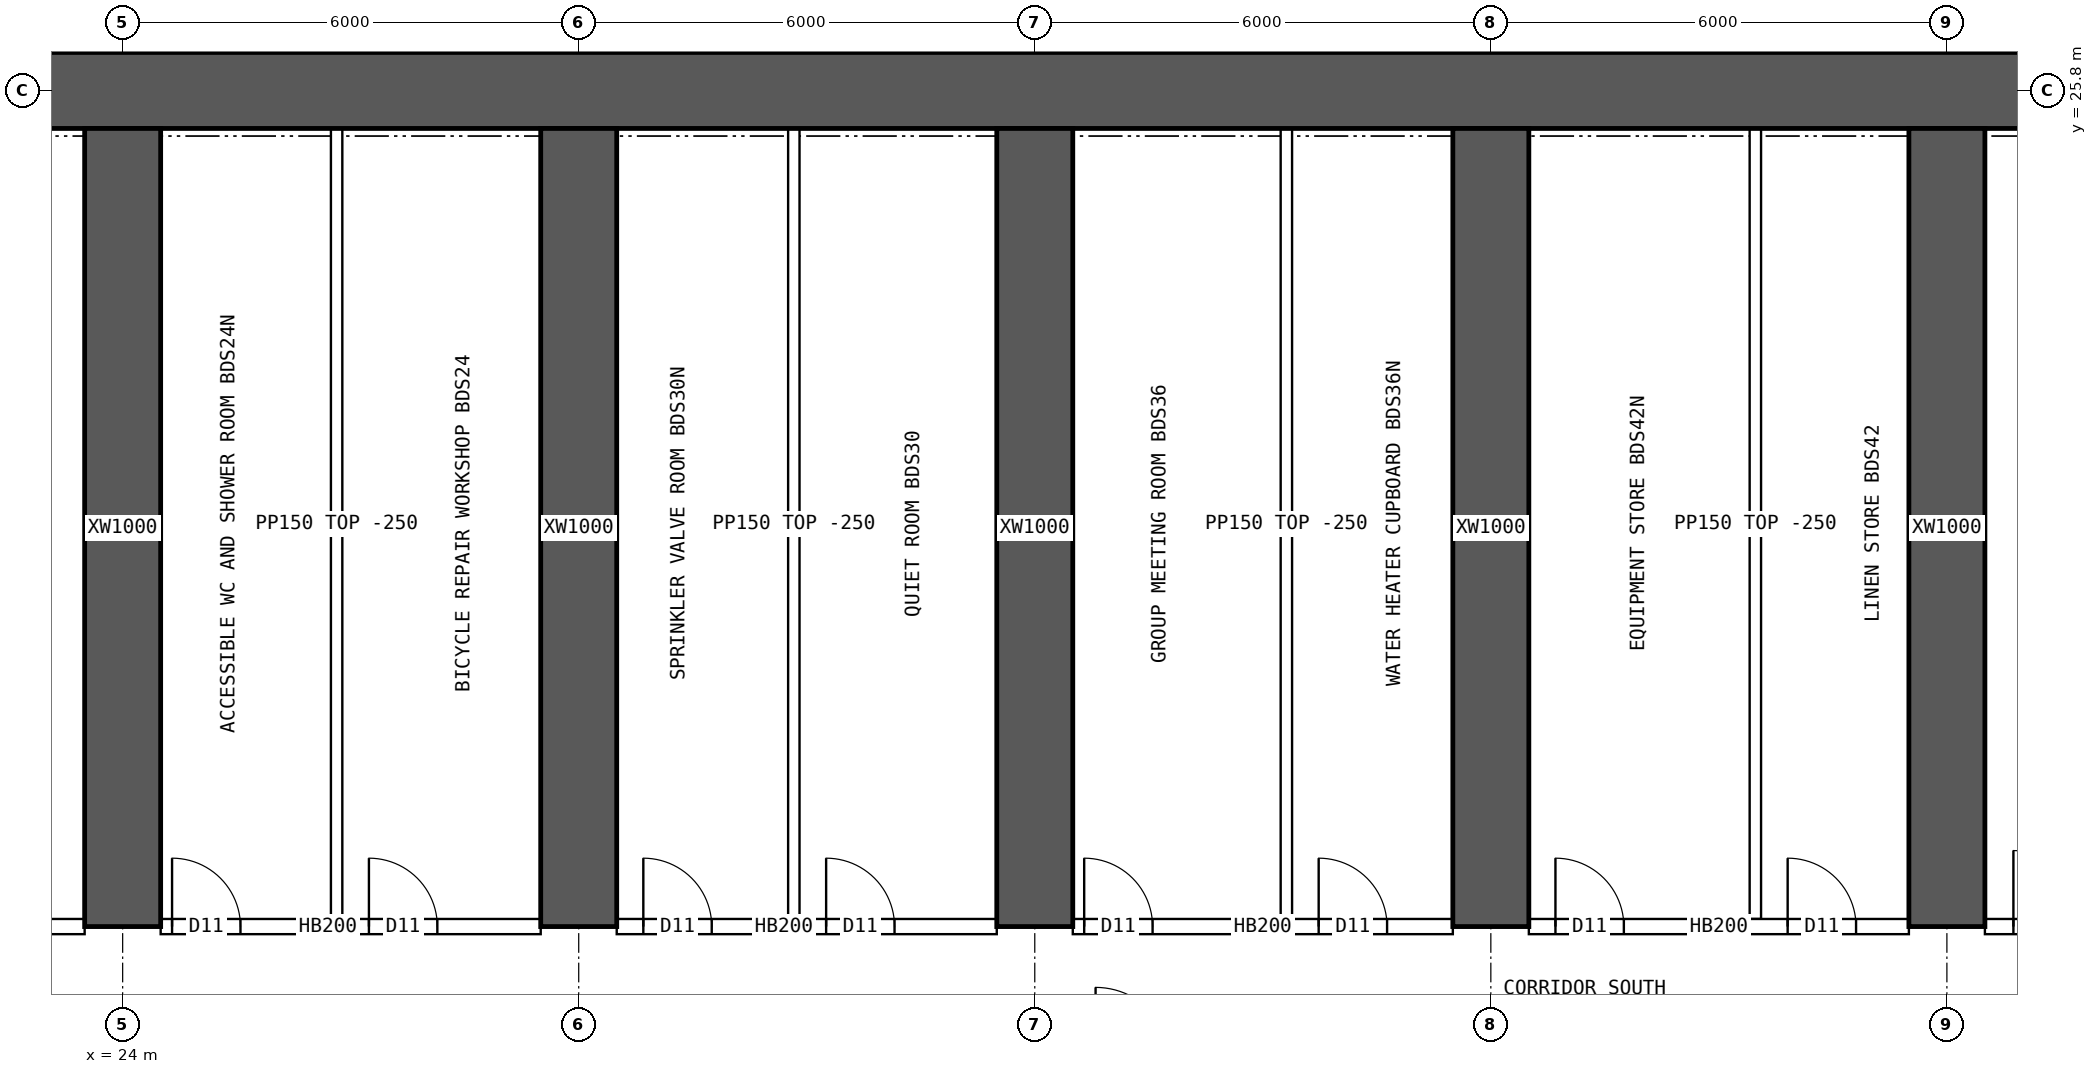
"""IFC4 building model, lengths in metres.
Left out: names, types, materials, properties, quantities, classifications, styles, units other than length and angle.
Written with IfcOpenShell. Run it as: python <this file> out.ifc"""

import sys

from ifc_helpers import new_model, si_unit, direction, frame, frame_2d, origin, place, context, subcontext, project, spatial, rectangle, extrude, element, fill, save


model = new_model("IFC4")
c1 = context("Model", 3, precision=1e-05, world=origin(), true_north=direction((0.0, 1.0)))
c2 = subcontext(c1, "Body", "Model", "MODEL_VIEW")
j1 = project(units=[si_unit("LENGTHUNIT", "METRE"), si_unit("PLANEANGLEUNIT", "RADIAN")], contexts=[c1])
p1 = place(None, origin())
s1 = spatial("IfcSite", under=j1, at=p1, CompositionType="ELEMENT")
p2 = place(p1, origin())
s2 = spatial("IfcBuilding", under=s1, at=p2, CompositionType="ELEMENT")
p3 = place(p2, frame((0.0, 0.0, 42.7)))
s3 = spatial("IfcBuildingStorey", under=s2, at=p3, CompositionType="ELEMENT", Elevation=42.7)
p4 = place(p3, frame((18.0, 25.8, 0.0), z_axis=(0.0, 0.0, 1.0), x_axis=(1.0, 0.0, 0.0)))
e1 = element("IfcWall", 1, at=p4, inside=s3, PredefinedType="SHEAR", context=c2, shape_type="SweptSolid", body=[
    extrude(rectangle(XDim=48.0, YDim=1.0, at=frame_2d((24.0, 0.0))), origin(), (0.0, 0.0, 1.0), 3.75),
])
for number, where, z_axis, x_axis in (
    (2, (24.0, 14.8, 0.0), (0.0, 0.0, 1.0), (0.0, 1.0, 0.0)),
    (3, (30.0, 14.8, 0.0), (0.0, 0.0, 1.0), (0.0, 1.0, 0.0)),
    (4, (36.0, 14.8, 0.0), (0.0, 0.0, 1.0), (0.0, 1.0, 0.0)),
    (5, (42.0, 14.8, 0.0), (0.0, 0.0, 1.0), (0.0, 1.0, 0.0)),
    (6, (48.0, 14.8, 0.0), (0.0, 0.0, 1.0), (0.0, 1.0, 0.0)),
):
    element("IfcWall", number, at=place(p3, frame(where, z_axis=z_axis, x_axis=x_axis)), inside=s3, PredefinedType="SHEAR", context=c2, shape_type="SweptSolid", body=[
        extrude(rectangle(XDim=10.5, YDim=1.0, at=frame_2d((5.25, 0.0))), origin(), (0.0, 0.0, 1.0), 3.75),
    ])
p5 = place(p3, frame((18.5, 14.8, 0.0), z_axis=(0.0, 0.0, 1.0), x_axis=(1.0, 0.0, 0.0)))
e7 = element("IfcWall", 7, at=p5, inside=s3, PredefinedType="SOLIDWALL", context=c2, shape_type="SweptSolid", body=[
    extrude(rectangle(XDim=5.0, YDim=0.2, at=frame_2d((2.5, 0.0))), origin(), (0.0, 0.0, 1.0), 3.5),
])
p6 = place(p5, frame((0.8, 0.0, 0.0)))
e8 = element("IfcOpeningElement", 8, at=p6, cuts=e7, PredefinedType="OPENING", context=c2, shape_type="SweptSolid", body=[
    extrude(rectangle(XDim=1.0, YDim=2.1, at=frame_2d((0.5, 1.05))), frame((0.0, 0.11, 0.0), z_axis=(0.0, -1.0, 0.0), x_axis=(1.0, 0.0, 0.0)), (0.0, 0.0, 1.0), 0.22),
])
p7 = place(p3, frame((24.5, 14.8, 0.0), z_axis=(0.0, 0.0, 1.0), x_axis=(1.0, 0.0, 0.0)))
e9 = element("IfcWall", 9, at=p7, inside=s3, PredefinedType="SOLIDWALL", context=c2, shape_type="SweptSolid", body=[
    extrude(rectangle(XDim=5.0, YDim=0.2, at=frame_2d((2.5, 0.0))), origin(), (0.0, 0.0, 1.0), 3.5),
])
p8 = place(p7, frame((0.15, 0.0, 0.0)))
e10 = element("IfcOpeningElement", 10, at=p8, cuts=e9, PredefinedType="OPENING", context=c2, shape_type="SweptSolid", body=[
    extrude(rectangle(XDim=0.9, YDim=2.1, at=frame_2d((0.45, 1.05))), frame((0.0, 0.11, 0.0), z_axis=(0.0, -1.0, 0.0), x_axis=(1.0, 0.0, 0.0)), (0.0, 0.0, 1.0), 0.22),
])
p9 = place(p7, frame((2.74, 0.0, 0.0)))
e11 = element("IfcOpeningElement", 11, at=p9, cuts=e9, PredefinedType="OPENING", context=c2, shape_type="SweptSolid", body=[
    extrude(rectangle(XDim=0.9, YDim=2.1, at=frame_2d((0.45, 1.05))), frame((0.0, 0.11, 0.0), z_axis=(0.0, -1.0, 0.0), x_axis=(1.0, 0.0, 0.0)), (0.0, 0.0, 1.0), 0.22),
])
p10 = place(p3, frame((30.5, 14.8, 0.0), z_axis=(0.0, 0.0, 1.0), x_axis=(1.0, 0.0, 0.0)))
e12 = element("IfcWall", 12, at=p10, inside=s3, PredefinedType="SOLIDWALL", context=c2, shape_type="SweptSolid", body=[
    extrude(rectangle(XDim=5.0, YDim=0.2, at=frame_2d((2.5, 0.0))), origin(), (0.0, 0.0, 1.0), 3.5),
])
p11 = place(p10, frame((0.35, 0.0, 0.0)))
e13 = element("IfcOpeningElement", 13, at=p11, cuts=e12, PredefinedType="OPENING", context=c2, shape_type="SweptSolid", body=[
    extrude(rectangle(XDim=0.9, YDim=2.1, at=frame_2d((0.45, 1.05))), frame((0.0, 0.11, 0.0), z_axis=(0.0, -1.0, 0.0), x_axis=(1.0, 0.0, 0.0)), (0.0, 0.0, 1.0), 0.22),
])
p12 = place(p10, frame((2.755, 0.0, 0.0)))
e14 = element("IfcOpeningElement", 14, at=p12, cuts=e12, PredefinedType="OPENING", context=c2, shape_type="SweptSolid", body=[
    extrude(rectangle(XDim=0.9, YDim=2.1, at=frame_2d((0.45, 1.05))), frame((0.0, 0.11, 0.0), z_axis=(0.0, -1.0, 0.0), x_axis=(1.0, 0.0, 0.0)), (0.0, 0.0, 1.0), 0.22),
])
p13 = place(p3, frame((36.5, 14.8, 0.0), z_axis=(0.0, 0.0, 1.0), x_axis=(1.0, 0.0, 0.0)))
e15 = element("IfcWall", 15, at=p13, inside=s3, PredefinedType="SOLIDWALL", context=c2, shape_type="SweptSolid", body=[
    extrude(rectangle(XDim=5.0, YDim=0.2, at=frame_2d((2.5, 0.0))), origin(), (0.0, 0.0, 1.0), 3.5),
])
p14 = place(p13, frame((0.15, 0.0, 0.0)))
e16 = element("IfcOpeningElement", 16, at=p14, cuts=e15, PredefinedType="OPENING", context=c2, shape_type="SweptSolid", body=[
    extrude(rectangle(XDim=0.9, YDim=2.1, at=frame_2d((0.45, 1.05))), frame((0.0, 0.11, 0.0), z_axis=(0.0, -1.0, 0.0), x_axis=(1.0, 0.0, 0.0)), (0.0, 0.0, 1.0), 0.22),
])
p15 = place(p13, frame((3.235, 0.0, 0.0)))
e17 = element("IfcOpeningElement", 17, at=p15, cuts=e15, PredefinedType="OPENING", context=c2, shape_type="SweptSolid", body=[
    extrude(rectangle(XDim=0.9, YDim=2.1, at=frame_2d((0.45, 1.05))), frame((0.0, 0.11, 0.0), z_axis=(0.0, -1.0, 0.0), x_axis=(1.0, 0.0, 0.0)), (0.0, 0.0, 1.0), 0.22),
])
p16 = place(p3, frame((42.5, 14.8, 0.0), z_axis=(0.0, 0.0, 1.0), x_axis=(1.0, 0.0, 0.0)))
e18 = element("IfcWall", 18, at=p16, inside=s3, PredefinedType="SOLIDWALL", context=c2, shape_type="SweptSolid", body=[
    extrude(rectangle(XDim=5.0, YDim=0.2, at=frame_2d((2.5, 0.0))), origin(), (0.0, 0.0, 1.0), 3.5),
])
p17 = place(p16, frame((0.35, 0.0, 0.0)))
e19 = element("IfcOpeningElement", 19, at=p17, cuts=e18, PredefinedType="OPENING", context=c2, shape_type="SweptSolid", body=[
    extrude(rectangle(XDim=0.9, YDim=2.1, at=frame_2d((0.45, 1.05))), frame((0.0, 0.11, 0.0), z_axis=(0.0, -1.0, 0.0), x_axis=(1.0, 0.0, 0.0)), (0.0, 0.0, 1.0), 0.22),
])
p18 = place(p16, frame((3.405, 0.0, 0.0)))
e20 = element("IfcOpeningElement", 20, at=p18, cuts=e18, PredefinedType="OPENING", context=c2, shape_type="SweptSolid", body=[
    extrude(rectangle(XDim=0.9, YDim=2.1, at=frame_2d((0.45, 1.05))), frame((0.0, 0.11, 0.0), z_axis=(0.0, -1.0, 0.0), x_axis=(1.0, 0.0, 0.0)), (0.0, 0.0, 1.0), 0.22),
])
p19 = place(p3, frame((48.5, 14.8, 0.0), z_axis=(0.0, 0.0, 1.0), x_axis=(1.0, 0.0, 0.0)))
e21 = element("IfcWall", 21, at=p19, inside=s3, PredefinedType="SOLIDWALL", context=c2, shape_type="SweptSolid", body=[
    extrude(rectangle(XDim=5.0, YDim=0.2, at=frame_2d((2.5, 0.0))), origin(), (0.0, 0.0, 1.0), 3.5),
])
p20 = place(p19, frame((0.375, 0.0, 0.0)))
e22 = element("IfcOpeningElement", 22, at=p20, cuts=e21, PredefinedType="OPENING", context=c2, shape_type="SweptSolid", body=[
    extrude(rectangle(XDim=1.0, YDim=2.1, at=frame_2d((0.5, 1.05))), frame((0.0, 0.11, 0.0), z_axis=(0.0, -1.0, 0.0), x_axis=(1.0, 0.0, 0.0)), (0.0, 0.0, 1.0), 0.22),
])
for number, where, z_axis, x_axis in (
    (23, (26.815, 14.9, 0.0), (0.0, 0.0, 1.0), (0.0, 1.0, 0.0)),
    (24, (32.83, 14.9, 0.0), (0.0, 0.0, 1.0), (0.0, 1.0, 0.0)),
    (25, (39.31, 14.9, 0.0), (0.0, 0.0, 1.0), (0.0, 1.0, 0.0)),
    (26, (45.48, 14.9, 0.0), (0.0, 0.0, 1.0), (0.0, 1.0, 0.0)),
):
    element("IfcWall", number, at=place(p3, frame(where, z_axis=z_axis, x_axis=x_axis)), inside=s3, PredefinedType="PARTITIONING", context=c2, shape_type="SweptSolid", body=[
        extrude(rectangle(XDim=10.4, YDim=0.15, at=frame_2d((5.2, 0.0))), origin(), (0.0, 0.0, 1.0), 3.5),
    ])
p21 = place(p8, origin())
e27 = element("IfcDoor", 27, at=p21, inside=s3, OperationType="SINGLE_SWING_LEFT", PredefinedType="DOOR", context=c2, shape_type="SweptSolid", body=[
    extrude(rectangle(XDim=0.9, YDim=2.1, at=frame_2d((0.45, 1.05))), frame((0.0, 0.025, 0.0), z_axis=(0.0, -1.0, 0.0), x_axis=(1.0, 0.0, 0.0)), (0.0, 0.0, 1.0), 0.05),
])
fill(e10, e27)
p22 = place(p9, origin())
e28 = element("IfcDoor", 28, at=p22, inside=s3, OperationType="SINGLE_SWING_LEFT", PredefinedType="DOOR", context=c2, shape_type="SweptSolid", body=[
    extrude(rectangle(XDim=0.9, YDim=2.1, at=frame_2d((0.45, 1.05))), frame((0.0, 0.025, 0.0), z_axis=(0.0, -1.0, 0.0), x_axis=(1.0, 0.0, 0.0)), (0.0, 0.0, 1.0), 0.05),
])
fill(e11, e28)
p23 = place(p11, origin())
e29 = element("IfcDoor", 29, at=p23, inside=s3, OperationType="SINGLE_SWING_LEFT", PredefinedType="DOOR", context=c2, shape_type="SweptSolid", body=[
    extrude(rectangle(XDim=0.9, YDim=2.1, at=frame_2d((0.45, 1.05))), frame((0.0, 0.025, 0.0), z_axis=(0.0, -1.0, 0.0), x_axis=(1.0, 0.0, 0.0)), (0.0, 0.0, 1.0), 0.05),
])
fill(e13, e29)
p24 = place(p12, origin())
e30 = element("IfcDoor", 30, at=p24, inside=s3, OperationType="SINGLE_SWING_LEFT", PredefinedType="DOOR", context=c2, shape_type="SweptSolid", body=[
    extrude(rectangle(XDim=0.9, YDim=2.1, at=frame_2d((0.45, 1.05))), frame((0.0, 0.025, 0.0), z_axis=(0.0, -1.0, 0.0), x_axis=(1.0, 0.0, 0.0)), (0.0, 0.0, 1.0), 0.05),
])
fill(e14, e30)
p25 = place(p14, origin())
e31 = element("IfcDoor", 31, at=p25, inside=s3, OperationType="SINGLE_SWING_LEFT", PredefinedType="DOOR", context=c2, shape_type="SweptSolid", body=[
    extrude(rectangle(XDim=0.9, YDim=2.1, at=frame_2d((0.45, 1.05))), frame((0.0, 0.025, 0.0), z_axis=(0.0, -1.0, 0.0), x_axis=(1.0, 0.0, 0.0)), (0.0, 0.0, 1.0), 0.05),
])
fill(e16, e31)
p26 = place(p15, origin())
e32 = element("IfcDoor", 32, at=p26, inside=s3, OperationType="SINGLE_SWING_LEFT", PredefinedType="DOOR", context=c2, shape_type="SweptSolid", body=[
    extrude(rectangle(XDim=0.9, YDim=2.1, at=frame_2d((0.45, 1.05))), frame((0.0, 0.025, 0.0), z_axis=(0.0, -1.0, 0.0), x_axis=(1.0, 0.0, 0.0)), (0.0, 0.0, 1.0), 0.05),
])
fill(e17, e32)
p27 = place(p17, origin())
e33 = element("IfcDoor", 33, at=p27, inside=s3, OperationType="SINGLE_SWING_LEFT", PredefinedType="DOOR", context=c2, shape_type="SweptSolid", body=[
    extrude(rectangle(XDim=0.9, YDim=2.1, at=frame_2d((0.45, 1.05))), frame((0.0, 0.025, 0.0), z_axis=(0.0, -1.0, 0.0), x_axis=(1.0, 0.0, 0.0)), (0.0, 0.0, 1.0), 0.05),
])
fill(e19, e33)
p28 = place(p18, origin())
e34 = element("IfcDoor", 34, at=p28, inside=s3, OperationType="SINGLE_SWING_LEFT", PredefinedType="DOOR", context=c2, shape_type="SweptSolid", body=[
    extrude(rectangle(XDim=0.9, YDim=2.1, at=frame_2d((0.45, 1.05))), frame((0.0, 0.025, 0.0), z_axis=(0.0, -1.0, 0.0), x_axis=(1.0, 0.0, 0.0)), (0.0, 0.0, 1.0), 0.05),
])
fill(e20, e34)
p29 = place(p20, origin())
e35 = element("IfcDoor", 35, at=p29, inside=s3, OperationType="SINGLE_SWING_LEFT", PredefinedType="DOOR", context=c2, shape_type="SweptSolid", body=[
    extrude(rectangle(XDim=1.0, YDim=2.1, at=frame_2d((0.5, 1.05))), frame((0.0, 0.025, 0.0), z_axis=(0.0, -1.0, 0.0), x_axis=(1.0, 0.0, 0.0)), (0.0, 0.0, 1.0), 0.05),
])
fill(e22, e35)
save(model, sys.argv[1])
